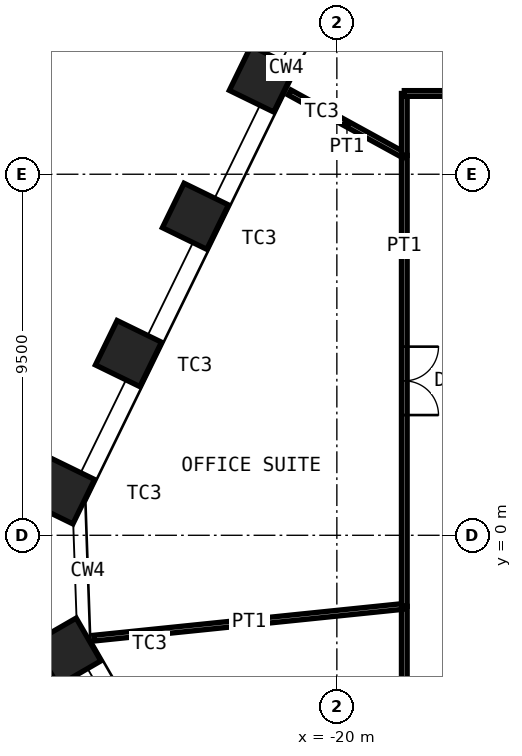
"""IFC4 building model, lengths in metres.
Left out: names, types, materials, properties, quantities, classifications, styles, units other than length and angle.
Written with IfcOpenShell. Run it as: python <this file> out.ifc"""

import sys

from ifc_helpers import new_model, si_unit, direction, frame, frame_2d, origin, origin_2d, place, context, subcontext, project, spatial, rectangle, hollow_rectangle, extrude, element, fill, save


model = new_model("IFC4")
c1 = context("Model", 3, precision=1e-05, world=origin(), true_north=direction((0.0, 1.0)))
c2 = subcontext(c1, "Body", "Model", "MODEL_VIEW")
j1 = project(units=[si_unit("LENGTHUNIT", "METRE"), si_unit("PLANEANGLEUNIT", "RADIAN")], contexts=[c1])
p1 = place(None, origin())
s1 = spatial("IfcSite", under=j1, at=p1, CompositionType="ELEMENT")
p2 = place(p1, origin())
s2 = spatial("IfcBuilding", under=s1, at=p2, CompositionType="ELEMENT")
p3 = place(p2, frame((0.0, 0.0, 136.6)))
s3 = spatial("IfcBuildingStorey", under=s2, at=p3, CompositionType="ELEMENT", Elevation=136.6)
for number, where, z_axis, x_axis in (
    (1, (-27.097, -3.067, 0.0), (0.0, 0.0, 1.0), (0.5, -0.866, 0.0)),
    (2, (-27.245, 1.169, 0.0), (0.0, 0.0, 1.0), (-0.438, -0.899, 0.0)),
    (3, (-25.483, 4.781, 0.0), (0.0, 0.0, 1.0), (-0.438, -0.899, 0.0)),
    (4, (-23.721, 8.394, 0.0), (0.0, 0.0, 1.0), (-0.438, -0.899, 0.0)),
    (5, (-21.959, 12.006, 0.0), (0.0, 0.0, 1.0), (-0.438, -0.899, 0.0)),
):
    element("IfcColumn", number, at=place(p3, frame(where, z_axis=z_axis, x_axis=x_axis)), inside=s3, PredefinedType="COLUMN", context=c2, shape_type="SweptSolid", body=[
        extrude(hollow_rectangle(XDim=1.3, YDim=1.3, WallThickness=0.1, at=origin_2d()), origin(), (0.0, 0.0, 1.0), 4.2),
    ])
p4 = place(p3, frame((-18.225, -11.625, 0.0), z_axis=(0.0, 0.0, 1.0), x_axis=(0.0, 1.0, 0.0)))
e6 = element("IfcWall", 6, at=p4, inside=s3, PredefinedType="PARTITIONING", context=c2, shape_type="SweptSolid", body=[
    extrude(rectangle(XDim=9.756, YDim=0.15, at=frame_2d((4.878, 0.0))), origin(), (0.0, 0.0, 1.0), 4.03),
])
p5 = place(p4, frame((3.978, 0.0, 0.0)))
e7 = element("IfcOpeningElement", 7, at=p5, cuts=e6, PredefinedType="OPENING", context=c2, shape_type="SweptSolid", body=[
    extrude(rectangle(XDim=1.8, YDim=2.4, at=frame_2d((0.9, 1.2))), frame((0.0, 0.085, 0.0), z_axis=(0.0, -1.0, 0.0), x_axis=(1.0, 0.0, 0.0)), (0.0, 0.0, 1.0), 0.17),
])
p6 = place(p3, frame((-26.391, -2.706, 0.0), z_axis=(0.0, 0.0, 1.0), x_axis=(0.994783450774, 0.102009245004, 0.0)))
e8 = element("IfcWall", 8, at=p6, inside=s3, PredefinedType="PARTITIONING", context=c2, shape_type="SweptSolid", body=[
    extrude(rectangle(XDim=8.209, YDim=0.15, at=frame_2d((4.104, 0.0))), origin(), (0.0, 0.0, 1.0), 2.93),
])
p7 = place(p3, frame((-18.225, -1.869, 0.0), z_axis=(0.0, 0.0, 1.0), x_axis=(0.0, 1.0, 0.0)))
e9 = element("IfcWall", 9, at=p7, inside=s3, PredefinedType="PARTITIONING", context=c2, shape_type="SweptSolid", body=[
    extrude(rectangle(XDim=11.865, YDim=0.15, at=frame_2d((5.932, 0.0))), origin(), (0.0, 0.0, 1.0), 4.03),
])
p8 = place(p7, frame((5.032, 0.0, 0.0)))
e10 = element("IfcOpeningElement", 10, at=p8, cuts=e9, PredefinedType="OPENING", context=c2, shape_type="SweptSolid", body=[
    extrude(rectangle(XDim=1.8, YDim=2.4, at=frame_2d((0.9, 1.2))), frame((0.0, 0.085, 0.0), z_axis=(0.0, -1.0, 0.0), x_axis=(1.0, 0.0, 0.0)), (0.0, 0.0, 1.0), 0.17),
])
p9 = place(p3, frame((-21.242, 11.651, 0.0), z_axis=(0.0, 0.0, 1.0), x_axis=(0.876768023831, -0.480913539409, 0.0)))
e11 = element("IfcWall", 11, at=p9, inside=s3, PredefinedType="PARTITIONING", context=c2, shape_type="SweptSolid", body=[
    extrude(rectangle(XDim=3.441, YDim=0.15, at=frame_2d((1.721, 0.0))), origin(), (0.0, 0.0, 1.0), 3.33),
])
p10 = place(p3, frame((-18.225, 9.996, 0.0), z_axis=(0.0, 0.0, 1.0), x_axis=(0.0, 1.0, 0.0)))
e12 = element("IfcWall", 12, at=p10, inside=s3, PredefinedType="PARTITIONING", context=c2, shape_type="SweptSolid", body=[
    extrude(rectangle(XDim=1.629, YDim=0.15, at=frame_2d((0.814, 0.0))), origin(), (0.0, 0.0, 1.0), 4.03),
])
p11 = place(p3, frame((-18.225, 11.625, 0.0), z_axis=(0.0, 0.0, 1.0), x_axis=(1.0, 0.0, 0.0)))
e13 = element("IfcWall", 13, at=p11, inside=s3, PredefinedType="PARTITIONING", context=c2, shape_type="SweptSolid", body=[
    extrude(rectangle(XDim=7.286, YDim=0.15, at=frame_2d((3.643, 0.0))), origin(), (0.0, 0.0, 1.0), 4.03),
])
p12 = place(p11, frame((3.143, 0.0, 0.0)))
e14 = element("IfcOpeningElement", 14, at=p12, cuts=e13, PredefinedType="OPENING", context=c2, shape_type="SweptSolid", body=[
    extrude(rectangle(XDim=1.0, YDim=2.4, at=frame_2d((0.5, 1.2))), frame((0.0, 0.085, 0.0), z_axis=(0.0, -1.0, 0.0), x_axis=(1.0, 0.0, 0.0)), (0.0, 0.0, 1.0), 0.17),
])
p13 = place(p3, frame((-17.738, 18.851, 0.0), z_axis=(0.0, 0.0, 1.0), x_axis=(0.685286406267, -0.728273672039, 0.0)))
e15 = element("IfcWall", 15, at=p13, inside=s3, PredefinedType="PARTITIONING", context=c2, shape_type="SweptSolid", body=[
    extrude(rectangle(XDim=9.922, YDim=0.15, at=frame_2d((4.961, 0.0))), origin(), (0.0, 0.0, 1.0), 3.33),
])
p14 = place(p8, origin())
e16 = element("IfcDoor", 16, at=p14, inside=s3, OperationType="DOUBLE_DOOR_DOUBLE_SWING", PredefinedType="DOOR", context=c2, shape_type="SweptSolid", body=[
    extrude(rectangle(XDim=1.8, YDim=2.4, at=frame_2d((0.9, 1.2))), frame((0.0, 0.025, 0.0), z_axis=(0.0, -1.0, 0.0), x_axis=(1.0, 0.0, 0.0)), (0.0, 0.0, 1.0), 0.05),
])
fill(e10, e16)
save(model, sys.argv[1])
